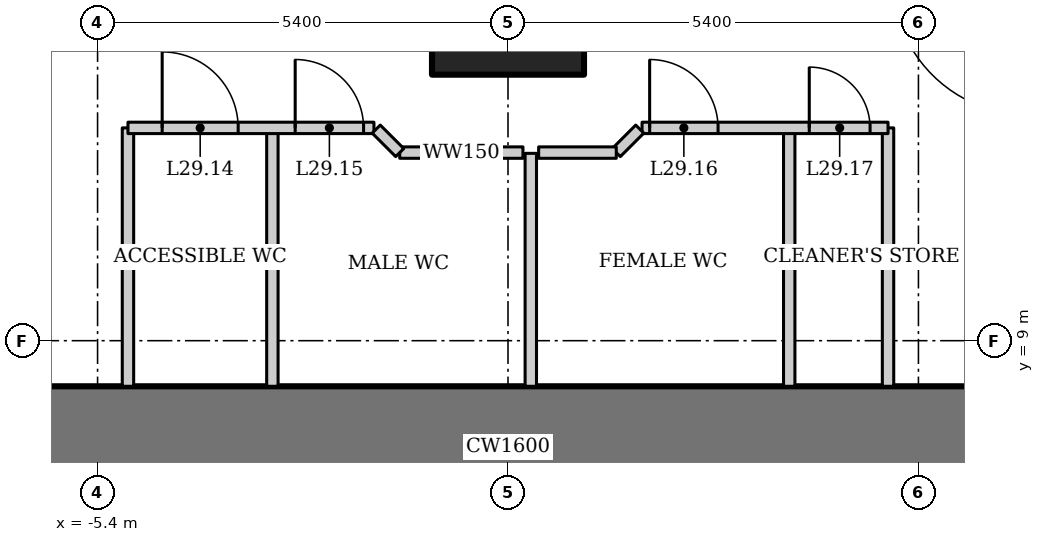
"""IFC4 building model, lengths in metres.
Left out: names, types, materials, properties, quantities, classifications, styles, units other than length and angle.
Written with IfcOpenShell. Run it as: python <this file> out.ifc"""

import sys

from ifc_helpers import new_model, si_unit, direction, frame, frame_2d, origin, origin_2d, place, context, subcontext, project, spatial, rectangle, hollow_rectangle, extrude, element, fill, save


model = new_model("IFC4")
c1 = context("Model", 3, precision=1e-05, world=origin(), true_north=direction((0.0, 1.0)))
c2 = subcontext(c1, "Body", "Model", "MODEL_VIEW")
j1 = project(units=[si_unit("LENGTHUNIT", "METRE"), si_unit("PLANEANGLEUNIT", "RADIAN")], contexts=[c1])
p1 = place(None, origin())
s1 = spatial("IfcSite", under=j1, at=p1, CompositionType="ELEMENT")
p2 = place(p1, origin())
s2 = spatial("IfcBuilding", under=s1, at=p2, CompositionType="ELEMENT")
p3 = place(p2, frame((0.0, 0.0, 125.8)))
s3 = spatial("IfcBuildingStorey", under=s2, at=p3, CompositionType="ELEMENT", Elevation=125.8)
p4 = place(p3, frame((0.0, 13.5, 0.0), z_axis=(0.0, 0.0, 1.0), x_axis=(1.0, 0.0, 0.0)))
e1 = element("IfcColumn", 1, at=p4, inside=s3, PredefinedType="COLUMN", context=c2, shape_type="SweptSolid", body=[
    extrude(hollow_rectangle(XDim=2.0, YDim=2.0, WallThickness=0.17, at=origin_2d()), origin(), (0.0, 0.0, 1.0), 4.2),
])
p5 = place(p3, frame((12.2, 7.6, 0.0), z_axis=(0.0, 0.0, 1.0), x_axis=(-1.0, 0.0, 0.0)))
e2 = element("IfcWall", 2, at=p5, inside=s3, PredefinedType="SHEAR", context=c2, shape_type="SweptSolid", body=[
    extrude(rectangle(XDim=24.4, YDim=1.6, at=frame_2d((12.2, 0.0))), origin(), (0.0, 0.0, 1.0), 4.2),
])
for number, where, z_axis, x_axis in (
    (3, (-5.0, 8.4, 0.0), (0.0, 0.0, 1.0), (0.0, 1.0, 0.0)),
    (4, (5.0, 8.4, 0.0), (0.0, 0.0, 1.0), (0.0, 1.0, 0.0)),
    (5, (-3.1, 8.4, 0.0), (0.0, 0.0, 1.0), (0.0, 1.0, 0.0)),
    (6, (3.7, 8.4, 0.0), (0.0, 0.0, 1.0), (0.0, 1.0, 0.0)),
):
    element("IfcWall", number, at=place(p3, frame(where, z_axis=z_axis, x_axis=x_axis)), inside=s3, PredefinedType="SOLIDWALL", context=c2, shape_type="SweptSolid", body=[
        extrude(rectangle(XDim=3.4, YDim=0.15, at=frame_2d((1.7, 0.0))), origin(), (0.0, 0.0, 1.0), 4.05),
    ])
p6 = place(p3, frame((-5.0, 11.8, 0.0), z_axis=(0.0, 0.0, 1.0), x_axis=(1.0, 0.0, 0.0)))
e7 = element("IfcWall", 7, at=p6, inside=s3, PredefinedType="SOLIDWALL", context=c2, shape_type="SweptSolid", body=[
    extrude(rectangle(XDim=3.236, YDim=0.15, at=frame_2d((1.618, 0.0))), origin(), (0.0, 0.0, 1.0), 4.05),
])
p7 = place(p6, frame((0.45, 0.0, 0.0)))
e8 = element("IfcOpeningElement", 8, at=p7, cuts=e7, PredefinedType="OPENING", context=c2, shape_type="SweptSolid", body=[
    extrude(rectangle(XDim=1.0, YDim=2.1, at=frame_2d((0.5, 1.05))), frame((0.0, 0.085, 0.0), z_axis=(0.0, -1.0, 0.0), x_axis=(1.0, 0.0, 0.0)), (0.0, 0.0, 1.0), 0.17),
])
p8 = place(p6, frame((2.2, 0.0, 0.0)))
e9 = element("IfcOpeningElement", 9, at=p8, cuts=e7, PredefinedType="OPENING", context=c2, shape_type="SweptSolid", body=[
    extrude(rectangle(XDim=0.9, YDim=2.1, at=frame_2d((0.45, 1.05))), frame((0.0, 0.085, 0.0), z_axis=(0.0, -1.0, 0.0), x_axis=(1.0, 0.0, 0.0)), (0.0, 0.0, 1.0), 0.17),
])
p9 = place(p3, frame((1.764, 11.8, 0.0), z_axis=(0.0, 0.0, 1.0), x_axis=(1.0, 0.0, 0.0)))
e10 = element("IfcWall", 10, at=p9, inside=s3, PredefinedType="SOLIDWALL", context=c2, shape_type="SweptSolid", body=[
    extrude(rectangle(XDim=3.236, YDim=0.15, at=frame_2d((1.618, 0.0))), origin(), (0.0, 0.0, 1.0), 4.05),
])
p10 = place(p9, frame((0.1, 0.0, 0.0)))
e11 = element("IfcOpeningElement", 11, at=p10, cuts=e10, PredefinedType="OPENING", context=c2, shape_type="SweptSolid", body=[
    extrude(rectangle(XDim=0.9, YDim=2.1, at=frame_2d((0.45, 1.05))), frame((0.0, 0.085, 0.0), z_axis=(0.0, -1.0, 0.0), x_axis=(1.0, 0.0, 0.0)), (0.0, 0.0, 1.0), 0.17),
])
p11 = place(p9, frame((2.2, 0.0, 0.0)))
e12 = element("IfcOpeningElement", 12, at=p11, cuts=e10, PredefinedType="OPENING", context=c2, shape_type="SweptSolid", body=[
    extrude(rectangle(XDim=0.8, YDim=2.1, at=frame_2d((0.4, 1.05))), frame((0.0, 0.085, 0.0), z_axis=(0.0, -1.0, 0.0), x_axis=(1.0, 0.0, 0.0)), (0.0, 0.0, 1.0), 0.17),
])
p12 = place(p3, frame((0.3, 8.4, 0.0), z_axis=(0.0, 0.0, 1.0), x_axis=(0.0, 1.0, 0.0)))
e13 = element("IfcWall", 13, at=p12, inside=s3, PredefinedType="SOLIDWALL", context=c2, shape_type="SweptSolid", body=[
    extrude(rectangle(XDim=3.065, YDim=0.15, at=frame_2d((1.533, 0.0))), origin(), (0.0, 0.0, 1.0), 4.05),
])
p13 = place(p3, frame((0.197, 11.475, 0.0), z_axis=(0.0, 0.0, 1.0), x_axis=(-1.0, 0.0, 0.0)))
e14 = element("IfcWall", 14, at=p13, inside=s3, PredefinedType="SOLIDWALL", context=c2, shape_type="SweptSolid", body=[
    extrude(rectangle(XDim=1.621, YDim=0.15, at=frame_2d((0.811, 0.0))), origin(), (0.0, 0.0, 1.0), 4.05),
])
for number, where, z_axis, x_axis in (
    (15, (-1.425, 11.475, 0.0), (0.0, 0.0, 1.0), (-0.707, 0.707, 0.0)),
    (16, (1.734, 11.784, 0.0), (0.0, 0.0, 1.0), (-0.707, -0.707, 0.0)),
):
    element("IfcWall", number, at=place(p3, frame(where, z_axis=z_axis, x_axis=x_axis)), inside=s3, PredefinedType="SOLIDWALL", context=c2, shape_type="SweptSolid", body=[
        extrude(rectangle(XDim=0.437, YDim=0.15, at=frame_2d((0.219, 0.0))), origin(), (0.0, 0.0, 1.0), 4.05),
    ])
p14 = place(p3, frame((1.425, 11.475, 0.0), z_axis=(0.0, 0.0, 1.0), x_axis=(-1.0, 0.0, 0.0)))
e17 = element("IfcWall", 17, at=p14, inside=s3, PredefinedType="SOLIDWALL", context=c2, shape_type="SweptSolid", body=[
    extrude(rectangle(XDim=1.021, YDim=0.15, at=frame_2d((0.511, 0.0))), origin(), (0.0, 0.0, 1.0), 4.05),
])
p15 = place(p7, origin())
e18 = element("IfcDoor", 18, at=p15, inside=s3, OperationType="SINGLE_SWING_LEFT", PredefinedType="DOOR", context=c2, shape_type="SweptSolid", body=[
    extrude(rectangle(XDim=1.0, YDim=2.1, at=frame_2d((0.5, 1.05))), frame((0.0, 0.025, 0.0), z_axis=(0.0, -1.0, 0.0), x_axis=(1.0, 0.0, 0.0)), (0.0, 0.0, 1.0), 0.05),
])
fill(e8, e18)
p16 = place(p8, origin())
e19 = element("IfcDoor", 19, at=p16, inside=s3, OperationType="SINGLE_SWING_LEFT", PredefinedType="DOOR", context=c2, shape_type="SweptSolid", body=[
    extrude(rectangle(XDim=0.9, YDim=2.1, at=frame_2d((0.45, 1.05))), frame((0.0, 0.025, 0.0), z_axis=(0.0, -1.0, 0.0), x_axis=(1.0, 0.0, 0.0)), (0.0, 0.0, 1.0), 0.05),
])
fill(e9, e19)
p17 = place(p10, origin())
e20 = element("IfcDoor", 20, at=p17, inside=s3, OperationType="SINGLE_SWING_LEFT", PredefinedType="DOOR", context=c2, shape_type="SweptSolid", body=[
    extrude(rectangle(XDim=0.9, YDim=2.1, at=frame_2d((0.45, 1.05))), frame((0.0, 0.025, 0.0), z_axis=(0.0, -1.0, 0.0), x_axis=(1.0, 0.0, 0.0)), (0.0, 0.0, 1.0), 0.05),
])
fill(e11, e20)
p18 = place(p11, origin())
e21 = element("IfcDoor", 21, at=p18, inside=s3, OperationType="SINGLE_SWING_LEFT", PredefinedType="DOOR", context=c2, shape_type="SweptSolid", body=[
    extrude(rectangle(XDim=0.8, YDim=2.1, at=frame_2d((0.4, 1.05))), frame((0.0, 0.025, 0.0), z_axis=(0.0, -1.0, 0.0), x_axis=(1.0, 0.0, 0.0)), (0.0, 0.0, 1.0), 0.05),
])
fill(e12, e21)
save(model, sys.argv[1])
